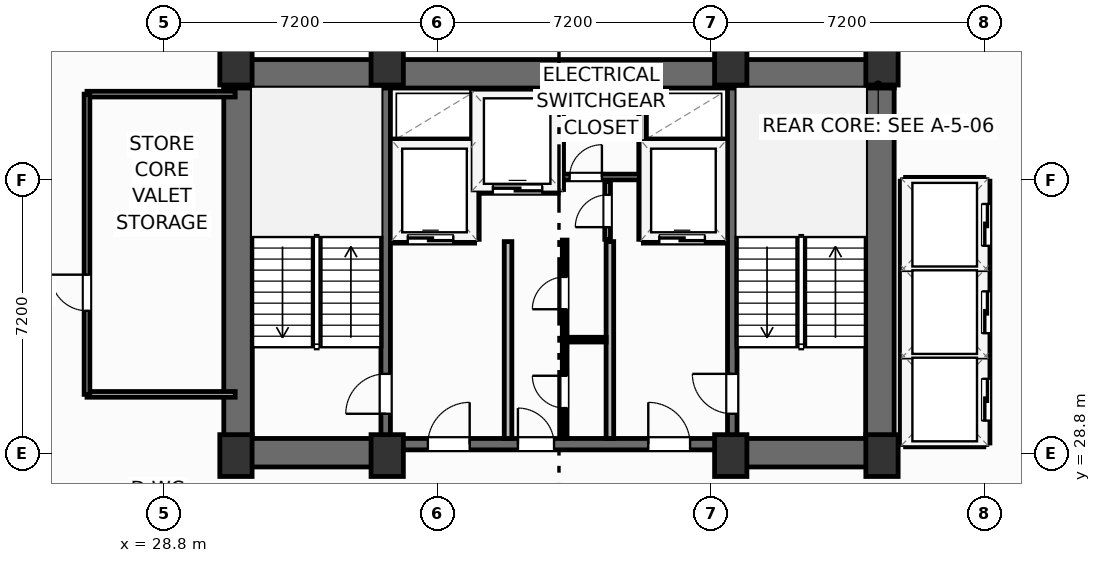
"""IFC4 building model, lengths in metres.
Left out: names, types, materials, properties, quantities, classifications, styles, units other than length and angle.
Written with IfcOpenShell. Run it as: python <this file> out.ifc"""

import sys

from ifc_helpers import new_model, si_unit, direction, frame, frame_2d, origin, origin_2d, place, context, subcontext, project, spatial, rectangle, extrude, element, fill, save


model = new_model("IFC4")
c1 = context("Model", 3, precision=1e-05, world=origin(), true_north=direction((0.0, 1.0)))
c2 = subcontext(c1, "Body", "Model", "MODEL_VIEW")
j1 = project(units=[si_unit("LENGTHUNIT", "METRE"), si_unit("PLANEANGLEUNIT", "RADIAN")], contexts=[c1])
p1 = place(None, origin())
s1 = spatial("IfcSite", under=j1, at=p1, CompositionType="ELEMENT")
p2 = place(p1, origin())
s2 = spatial("IfcBuilding", under=s1, at=p2, CompositionType="ELEMENT")
p3 = place(p2, frame((0.0, 0.0, 147.6)))
s3 = spatial("IfcBuildingStorey", under=s2, at=p3, CompositionType="ELEMENT", Elevation=147.6)
for number, where, z_axis, x_axis in (
    (1, (30.7, 28.75, 0.0), (0.0, 0.0, 1.0), (1.0, 0.0, 0.0)),
    (2, (34.68, 28.75, 0.0), (0.0, 0.0, 1.0), (1.0, 0.0, 0.0)),
    (3, (43.72, 28.75, 0.0), (0.0, 0.0, 1.0), (1.0, 0.0, 0.0)),
    (4, (47.7, 28.75, 0.0), (0.0, 0.0, 1.0), (1.0, 0.0, 0.0)),
    (5, (30.7, 39.05, 0.0), (0.0, 0.0, 1.0), (1.0, 0.0, 0.0)),
    (6, (34.68, 39.05, 0.0), (0.0, 0.0, 1.0), (1.0, 0.0, 0.0)),
    (7, (43.72, 39.05, 0.0), (0.0, 0.0, 1.0), (1.0, 0.0, 0.0)),
    (8, (47.7, 39.05, 0.0), (0.0, 0.0, 1.0), (1.0, 0.0, 0.0)),
):
    element("IfcColumn", number, at=place(p3, frame(where, z_axis=z_axis, x_axis=x_axis)), inside=s3, PredefinedType="COLUMN", context=c2, shape_type="SweptSolid", body=[
        extrude(rectangle(XDim=0.85, YDim=1.1, at=origin_2d()), origin(), (0.0, 0.0, 1.0), 3.7),
    ])
p4 = place(p3, frame((30.38, 38.795, 0.0), z_axis=(0.0, 0.0, 1.0), x_axis=(1.0, 0.0, 0.0)))
e9 = element("IfcWall", 9, at=p4, inside=s3, PredefinedType="SHEAR", context=c2, shape_type="SweptSolid", body=[
    extrude(rectangle(XDim=17.64, YDim=0.75, at=frame_2d((8.82, 0.0))), origin(), (0.0, 0.0, 1.0), 3.45),
])
for number, where, z_axis, x_axis in (
    (10, (30.755, 29.2, 0.0), (0.0, 0.0, 1.0), (0.0, 1.0, 0.0)),
    (11, (47.645, 29.2, 0.0), (0.0, 0.0, 1.0), (0.0, 1.0, 0.0)),
):
    element("IfcWall", number, at=place(p3, frame(where, z_axis=z_axis, x_axis=x_axis)), inside=s3, PredefinedType="SHEAR", context=c2, shape_type="SweptSolid", body=[
        extrude(rectangle(XDim=9.22, YDim=0.75, at=frame_2d((4.61, 0.0))), origin(), (0.0, 0.0, 1.0), 3.45),
    ])
p5 = place(p3, frame((30.38, 28.825, 0.0), z_axis=(0.0, 0.0, 1.0), x_axis=(1.0, 0.0, 0.0)))
e12 = element("IfcWall", 12, at=p5, inside=s3, PredefinedType="SHEAR", context=c2, shape_type="SweptSolid", body=[
    extrude(rectangle(XDim=4.42, YDim=0.75, at=frame_2d((2.21, 0.0))), origin(), (0.0, 0.0, 1.0), 3.45),
])
p6 = place(p3, frame((43.6, 28.825, 0.0), z_axis=(0.0, 0.0, 1.0), x_axis=(1.0, 0.0, 0.0)))
e13 = element("IfcWall", 13, at=p6, inside=s3, PredefinedType="SHEAR", context=c2, shape_type="SweptSolid", body=[
    extrude(rectangle(XDim=4.42, YDim=0.75, at=frame_2d((2.21, 0.0))), origin(), (0.0, 0.0, 1.0), 3.45),
])
p7 = place(p3, frame((34.8, 29.05, 0.0), z_axis=(0.0, 0.0, 1.0), x_axis=(1.0, 0.0, 0.0)))
e14 = element("IfcWall", 14, at=p7, inside=s3, PredefinedType="SHEAR", context=c2, shape_type="SweptSolid", body=[
    extrude(rectangle(XDim=8.8, YDim=0.3, at=frame_2d((4.4, 0.0))), origin(), (0.0, 0.0, 1.0), 3.45),
])
p8 = place(p7, frame((0.95, 0.0, 0.0)))
e15 = element("IfcOpeningElement", 15, at=p8, cuts=e14, PredefinedType="OPENING", context=c2, shape_type="SweptSolid", body=[
    extrude(rectangle(XDim=1.1, YDim=2.15, at=frame_2d((0.55, 1.075))), frame((0.0, 0.16, 0.0), z_axis=(0.0, -1.0, 0.0), x_axis=(1.0, 0.0, 0.0)), (0.0, 0.0, 1.0), 0.32),
])
p9 = place(p7, frame((6.75, 0.0, 0.0)))
e16 = element("IfcOpeningElement", 16, at=p9, cuts=e14, PredefinedType="OPENING", context=c2, shape_type="SweptSolid", body=[
    extrude(rectangle(XDim=1.1, YDim=2.15, at=frame_2d((0.55, 1.075))), frame((0.0, 0.16, 0.0), z_axis=(0.0, -1.0, 0.0), x_axis=(1.0, 0.0, 0.0)), (0.0, 0.0, 1.0), 0.32),
])
p10 = place(p7, frame((3.32, 0.0, 0.0)))
e17 = element("IfcOpeningElement", 17, at=p10, cuts=e14, PredefinedType="OPENING", context=c2, shape_type="SweptSolid", body=[
    extrude(rectangle(XDim=0.95, YDim=2.15, at=frame_2d((0.475, 1.075))), frame((0.0, 0.16, 0.0), z_axis=(0.0, -1.0, 0.0), x_axis=(1.0, 0.0, 0.0)), (0.0, 0.0, 1.0), 0.32),
])
p11 = place(p3, frame((34.64, 29.2, 0.0), z_axis=(0.0, 0.0, 1.0), x_axis=(0.0, 1.0, 0.0)))
e18 = element("IfcWall", 18, at=p11, inside=s3, PredefinedType="SHEAR", context=c2, shape_type="SweptSolid", body=[
    extrude(rectangle(XDim=9.22, YDim=0.25, at=frame_2d((4.61, 0.0))), origin(), (0.0, 0.0, 1.0), 3.45),
])
p12 = place(p11, frame((0.65, 0.0, 0.0)))
e19 = element("IfcOpeningElement", 19, at=p12, cuts=e18, PredefinedType="OPENING", context=c2, shape_type="SweptSolid", body=[
    extrude(rectangle(XDim=1.05, YDim=2.15, at=frame_2d((0.525, 1.075))), frame((0.0, 0.135, 0.0), z_axis=(0.0, -1.0, 0.0), x_axis=(1.0, 0.0, 0.0)), (0.0, 0.0, 1.0), 0.27),
])
p13 = place(p3, frame((43.76, 29.2, 0.0), z_axis=(0.0, 0.0, 1.0), x_axis=(0.0, 1.0, 0.0)))
e20 = element("IfcWall", 20, at=p13, inside=s3, PredefinedType="SHEAR", context=c2, shape_type="SweptSolid", body=[
    extrude(rectangle(XDim=9.22, YDim=0.25, at=frame_2d((4.61, 0.0))), origin(), (0.0, 0.0, 1.0), 3.45),
])
p14 = place(p13, frame((0.65, 0.0, 0.0)))
e21 = element("IfcOpeningElement", 21, at=p14, cuts=e20, PredefinedType="OPENING", context=c2, shape_type="SweptSolid", body=[
    extrude(rectangle(XDim=1.05, YDim=2.15, at=frame_2d((0.525, 1.075))), frame((0.0, 0.135, 0.0), z_axis=(0.0, -1.0, 0.0), x_axis=(1.0, 0.0, 0.0)), (0.0, 0.0, 1.0), 0.27),
])
for number, where, z_axis, x_axis in (
    (22, (37.86, 29.2, 0.0), (0.0, 0.0, 1.0), (0.0, 1.0, 0.0)),
    (23, (40.54, 29.2, 0.0), (0.0, 0.0, 1.0), (0.0, 1.0, 0.0)),
):
    element("IfcWall", number, at=place(p3, frame(where, z_axis=z_axis, x_axis=x_axis)), inside=s3, PredefinedType="PARTITIONING", context=c2, shape_type="SweptSolid", body=[
        extrude(rectangle(XDim=5.18, YDim=0.2, at=frame_2d((2.59, 0.0))), origin(), (0.0, 0.0, 1.0), 3.45),
    ])
p15 = place(p3, frame((34.8, 34.44, 0.0), z_axis=(0.0, 0.0, 1.0), x_axis=(1.0, 0.0, 0.0)))
e24 = element("IfcWall", 24, at=p15, inside=s3, PredefinedType="PARTITIONING", context=c2, shape_type="SweptSolid", body=[
    extrude(rectangle(XDim=2.18, YDim=0.2, at=frame_2d((1.09, 0.0))), origin(), (0.0, 0.0, 1.0), 3.45),
])
p16 = place(p15, frame((0.42, 0.0, 0.0)))
e25 = element("IfcOpeningElement", 25, at=p16, cuts=e24, PredefinedType="OPENING", context=c2, shape_type="SweptSolid", body=[
    extrude(rectangle(XDim=1.2, YDim=2.2, at=frame_2d((0.6, 1.1))), frame((0.0, 0.11, 0.0), z_axis=(0.0, -1.0, 0.0), x_axis=(1.0, 0.0, 0.0)), (0.0, 0.0, 1.0), 0.22),
])
p17 = place(p3, frame((34.8, 36.98, 0.0), z_axis=(0.0, 0.0, 1.0), x_axis=(1.0, 0.0, 0.0)))
e26 = element("IfcWall", 26, at=p17, inside=s3, PredefinedType="PARTITIONING", context=c2, shape_type="SweptSolid", body=[
    extrude(rectangle(XDim=2.18, YDim=0.2, at=frame_2d((1.09, 0.0))), origin(), (0.0, 0.0, 1.0), 3.45),
])
p18 = place(p3, frame((37.0, 34.44, 0.0), z_axis=(0.0, 0.0, 1.0), x_axis=(0.0, 1.0, 0.0)))
e27 = element("IfcWall", 27, at=p18, inside=s3, PredefinedType="PARTITIONING", context=c2, shape_type="SweptSolid", body=[
    extrude(rectangle(XDim=3.9, YDim=0.2, at=frame_2d((1.95, 0.0))), origin(), (0.0, 0.0, 1.0), 3.45),
])
p19 = place(p3, frame((41.42, 34.44, 0.0), z_axis=(0.0, 0.0, 1.0), x_axis=(1.0, 0.0, 0.0)))
e28 = element("IfcWall", 28, at=p19, inside=s3, PredefinedType="PARTITIONING", context=c2, shape_type="SweptSolid", body=[
    extrude(rectangle(XDim=2.18, YDim=0.2, at=frame_2d((1.09, 0.0))), origin(), (0.0, 0.0, 1.0), 3.45),
])
p20 = place(p19, frame((0.42, 0.0, 0.0)))
e29 = element("IfcOpeningElement", 29, at=p20, cuts=e28, PredefinedType="OPENING", context=c2, shape_type="SweptSolid", body=[
    extrude(rectangle(XDim=1.2, YDim=2.2, at=frame_2d((0.6, 1.1))), frame((0.0, 0.11, 0.0), z_axis=(0.0, -1.0, 0.0), x_axis=(1.0, 0.0, 0.0)), (0.0, 0.0, 1.0), 0.22),
])
p21 = place(p3, frame((41.42, 36.98, 0.0), z_axis=(0.0, 0.0, 1.0), x_axis=(1.0, 0.0, 0.0)))
e30 = element("IfcWall", 30, at=p21, inside=s3, PredefinedType="PARTITIONING", context=c2, shape_type="SweptSolid", body=[
    extrude(rectangle(XDim=2.18, YDim=0.2, at=frame_2d((1.09, 0.0))), origin(), (0.0, 0.0, 1.0), 3.45),
])
p22 = place(p3, frame((41.4, 34.44, 0.0), z_axis=(0.0, 0.0, 1.0), x_axis=(0.0, 1.0, 0.0)))
e31 = element("IfcWall", 31, at=p22, inside=s3, PredefinedType="PARTITIONING", context=c2, shape_type="SweptSolid", body=[
    extrude(rectangle(XDim=3.9, YDim=0.2, at=frame_2d((1.95, 0.0))), origin(), (0.0, 0.0, 1.0), 3.45),
])
p23 = place(p3, frame((37.06, 35.75, 0.0), z_axis=(0.0, 0.0, 1.0), x_axis=(1.0, 0.0, 0.0)))
e32 = element("IfcWall", 32, at=p23, inside=s3, PredefinedType="PARTITIONING", context=c2, shape_type="SweptSolid", body=[
    extrude(rectangle(XDim=2.12, YDim=0.2, at=frame_2d((1.06, 0.0))), origin(), (0.0, 0.0, 1.0), 3.45),
])
p24 = place(p23, frame((0.4, 0.0, 0.0)))
e33 = element("IfcOpeningElement", 33, at=p24, cuts=e32, PredefinedType="OPENING", context=c2, shape_type="SweptSolid", body=[
    extrude(rectangle(XDim=1.3, YDim=2.2, at=frame_2d((0.65, 1.1))), frame((0.0, 0.11, 0.0), z_axis=(0.0, -1.0, 0.0), x_axis=(1.0, 0.0, 0.0)), (0.0, 0.0, 1.0), 0.22),
])
p25 = place(p3, frame((39.22, 35.75, 0.0), z_axis=(0.0, 0.0, 1.0), x_axis=(0.0, 1.0, 0.0)))
e34 = element("IfcWall", 34, at=p25, inside=s3, PredefinedType="PARTITIONING", context=c2, shape_type="SweptSolid", body=[
    extrude(rectangle(XDim=2.59, YDim=0.2, at=frame_2d((1.295, 0.0))), origin(), (0.0, 0.0, 1.0), 3.45),
])
p26 = place(p3, frame((39.3, 36.08, 0.0), z_axis=(0.0, 0.0, 1.0), x_axis=(1.0, 0.0, 0.0)))
e35 = element("IfcWall", 35, at=p26, inside=s3, PredefinedType="PARTITIONING", context=c2, shape_type="SweptSolid", body=[
    extrude(rectangle(XDim=2.02, YDim=0.15, at=frame_2d((1.01, 0.0))), origin(), (0.0, 0.0, 1.0), 3.45),
])
p27 = place(p26, frame((0.18, 0.0, 0.0)))
e36 = element("IfcOpeningElement", 36, at=p27, cuts=e35, PredefinedType="OPENING", context=c2, shape_type="SweptSolid", body=[
    extrude(rectangle(XDim=0.85, YDim=2.05, at=frame_2d((0.425, 1.025))), frame((0.0, 0.085, 0.0), z_axis=(0.0, -1.0, 0.0), x_axis=(1.0, 0.0, 0.0)), (0.0, 0.0, 1.0), 0.17),
])
p28 = place(p3, frame((40.48, 34.44, 0.0), z_axis=(0.0, 0.0, 1.0), x_axis=(0.0, 1.0, 0.0)))
e37 = element("IfcWall", 37, at=p28, inside=s3, PredefinedType="PARTITIONING", context=c2, shape_type="SweptSolid", body=[
    extrude(rectangle(XDim=1.52, YDim=0.15, at=frame_2d((0.76, 0.0))), origin(), (0.0, 0.0, 1.0), 3.45),
])
p29 = place(p28, frame((0.32, 0.0, 0.0)))
e38 = element("IfcOpeningElement", 38, at=p29, cuts=e37, PredefinedType="OPENING", context=c2, shape_type="SweptSolid", body=[
    extrude(rectangle(XDim=0.85, YDim=2.05, at=frame_2d((0.425, 1.025))), frame((0.0, 0.085, 0.0), z_axis=(0.0, -1.0, 0.0), x_axis=(1.0, 0.0, 0.0)), (0.0, 0.0, 1.0), 0.17),
])
p30 = place(p3, frame((39.35, 31.8, 0.0), z_axis=(0.0, 0.0, 1.0), x_axis=(1.0, 0.0, 0.0)))
e39 = element("IfcWall", 39, at=p30, inside=s3, PredefinedType="PARTITIONING", context=c2, shape_type="SweptSolid", body=[
    extrude(rectangle(XDim=1.09, YDim=0.125, at=frame_2d((0.545, 0.0))), origin(), (0.0, 0.0, 1.0), 3.45),
])
p31 = place(p3, frame((39.35, 29.2, 0.0), z_axis=(0.0, 0.0, 1.0), x_axis=(0.0, 1.0, 0.0)))
e40 = element("IfcWall", 40, at=p31, inside=s3, PredefinedType="PARTITIONING", context=c2, shape_type="SweptSolid", body=[
    extrude(rectangle(XDim=5.22, YDim=0.125, at=frame_2d((2.61, 0.0))), origin(), (0.0, 0.0, 1.0), 3.45),
])
p32 = place(p31, frame((0.8, 0.0, 0.0)))
e41 = element("IfcOpeningElement", 41, at=p32, cuts=e40, PredefinedType="OPENING", context=c2, shape_type="SweptSolid", body=[
    extrude(rectangle(XDim=0.85, YDim=2.05, at=frame_2d((0.425, 1.025))), frame((0.0, 0.073, 0.0), z_axis=(0.0, -1.0, 0.0), x_axis=(1.0, 0.0, 0.0)), (0.0, 0.0, 1.0), 0.145),
])
p33 = place(p31, frame((3.4, 0.0, 0.0)))
e42 = element("IfcOpeningElement", 42, at=p33, cuts=e40, PredefinedType="OPENING", context=c2, shape_type="SweptSolid", body=[
    extrude(rectangle(XDim=0.85, YDim=2.05, at=frame_2d((0.425, 1.025))), frame((0.0, 0.073, 0.0), z_axis=(0.0, -1.0, 0.0), x_axis=(1.0, 0.0, 0.0)), (0.0, 0.0, 1.0), 0.145),
])
for number, where, z_axis, x_axis in (
    (43, (26.78, 30.36, 0.0), (0.0, 0.0, 1.0), (1.0, 0.0, 0.0)),
    (44, (26.78, 38.26, 0.0), (0.0, 0.0, 1.0), (1.0, 0.0, 0.0)),
):
    element("IfcWall", number, at=place(p3, frame(where, z_axis=z_axis, x_axis=x_axis)), inside=s3, PredefinedType="PARTITIONING", context=c2, shape_type="SweptSolid", body=[
        extrude(rectangle(XDim=3.9, YDim=0.15, at=frame_2d((1.95, 0.0))), origin(), (0.0, 0.0, 1.0), 3.45),
    ])
p34 = place(p3, frame((26.78, 30.36, 0.0), z_axis=(0.0, 0.0, 1.0), x_axis=(0.0, 1.0, 0.0)))
e45 = element("IfcWall", 45, at=p34, inside=s3, PredefinedType="PARTITIONING", context=c2, shape_type="SweptSolid", body=[
    extrude(rectangle(XDim=7.9, YDim=0.15, at=frame_2d((3.95, 0.0))), origin(), (0.0, 0.0, 1.0), 3.45),
])
p35 = place(p34, frame((2.2, 0.0, 0.0)))
e46 = element("IfcOpeningElement", 46, at=p35, cuts=e45, PredefinedType="OPENING", context=c2, shape_type="SweptSolid", body=[
    extrude(rectangle(XDim=0.95, YDim=2.05, at=frame_2d((0.475, 1.025))), frame((0.0, 0.085, 0.0), z_axis=(0.0, -1.0, 0.0), x_axis=(1.0, 0.0, 0.0)), (0.0, 0.0, 1.0), 0.17),
])
for number, where, z_axis, x_axis in (
    (47, (48.32, 31.375, 0.0), (0.0, 0.0, 1.0), (1.0, 0.0, 0.0)),
    (48, (48.32, 33.675, 0.0), (0.0, 0.0, 1.0), (1.0, 0.0, 0.0)),
):
    element("IfcWall", number, at=place(p3, frame(where, z_axis=z_axis, x_axis=x_axis)), inside=s3, PredefinedType="PARTITIONING", context=c2, shape_type="SweptSolid", body=[
        extrude(rectangle(XDim=2.06, YDim=0.2, at=frame_2d((1.03, 0.0))), origin(), (0.0, 0.0, 1.0), 3.45),
    ])
p36 = place(p3, frame((48.32, 29.08, 0.0), z_axis=(0.0, 0.0, 1.0), x_axis=(1.0, 0.0, 0.0)))
e49 = element("IfcWall", 49, at=p36, inside=s3, PredefinedType="PARTITIONING", context=c2, shape_type="SweptSolid", body=[
    extrude(rectangle(XDim=2.06, YDim=0.2, at=frame_2d((1.03, 0.0))), origin(), (0.0, 0.0, 1.0), 2.662),
])
p37 = place(p3, frame((48.32, 35.97, 0.0), z_axis=(0.0, 0.0, 1.0), x_axis=(1.0, 0.0, 0.0)))
e50 = element("IfcWall", 50, at=p37, inside=s3, PredefinedType="PARTITIONING", context=c2, shape_type="SweptSolid", body=[
    extrude(rectangle(XDim=2.06, YDim=0.2, at=frame_2d((1.03, 0.0))), origin(), (0.0, 0.0, 1.0), 3.45),
])
p38 = place(p3, frame((48.28, 29.08, 0.0), z_axis=(0.0, 0.0, 1.0), x_axis=(0.0, 1.0, 0.0)))
e51 = element("IfcWall", 51, at=p38, inside=s3, PredefinedType="PARTITIONING", context=c2, shape_type="SweptSolid", body=[
    extrude(rectangle(XDim=6.89, YDim=0.2, at=frame_2d((3.445, 0.0))), origin(), (0.0, 0.0, 1.0), 3.45),
])
p39 = place(p3, frame((50.44, 29.08, 0.0), z_axis=(0.0, 0.0, 1.0), x_axis=(0.0, 1.0, 0.0)))
e52 = element("IfcWall", 52, at=p39, inside=s3, PredefinedType="PARTITIONING", context=c2, shape_type="SweptSolid", body=[
    extrude(rectangle(XDim=6.89, YDim=0.2, at=frame_2d((3.445, 0.0))), origin(), (0.0, 0.0, 1.0), 3.45),
])
p40 = place(p39, frame((0.59, 0.0, 0.0)))
e53 = element("IfcOpeningElement", 53, at=p40, cuts=e52, PredefinedType="OPENING", context=c2, shape_type="SweptSolid", body=[
    extrude(rectangle(XDim=1.1, YDim=2.15, at=frame_2d((0.55, 1.075))), frame((0.0, 0.11, 0.0), z_axis=(0.0, -1.0, 0.0), x_axis=(1.0, 0.0, 0.0)), (0.0, 0.0, 1.0), 0.22),
])
p41 = place(p39, frame((2.89, 0.0, 0.0)))
e54 = element("IfcOpeningElement", 54, at=p41, cuts=e52, PredefinedType="OPENING", context=c2, shape_type="SweptSolid", body=[
    extrude(rectangle(XDim=1.1, YDim=2.15, at=frame_2d((0.55, 1.075))), frame((0.0, 0.11, 0.0), z_axis=(0.0, -1.0, 0.0), x_axis=(1.0, 0.0, 0.0)), (0.0, 0.0, 1.0), 0.22),
])
p42 = place(p39, frame((5.19, 0.0, 0.0)))
e55 = element("IfcOpeningElement", 55, at=p42, cuts=e52, PredefinedType="OPENING", context=c2, shape_type="SweptSolid", body=[
    extrude(rectangle(XDim=1.1, YDim=2.15, at=frame_2d((0.55, 1.075))), frame((0.0, 0.11, 0.0), z_axis=(0.0, -1.0, 0.0), x_axis=(1.0, 0.0, 0.0)), (0.0, 0.0, 1.0), 0.22),
])
p43 = place(p12, origin())
e56 = element("IfcDoor", 56, at=p43, inside=s3, OperationType="SINGLE_SWING_LEFT", PredefinedType="DOOR", context=c2, shape_type="SweptSolid", body=[
    extrude(rectangle(XDim=1.05, YDim=2.15, at=frame_2d((0.525, 1.075))), frame((0.0, 0.025, 0.0), z_axis=(0.0, -1.0, 0.0), x_axis=(1.0, 0.0, 0.0)), (0.0, 0.0, 1.0), 0.05),
])
fill(e19, e56)
p44 = place(p14, origin())
e57 = element("IfcDoor", 57, at=p44, inside=s3, OperationType="SINGLE_SWING_RIGHT", PredefinedType="DOOR", context=c2, shape_type="SweptSolid", body=[
    extrude(rectangle(XDim=1.05, YDim=2.15, at=frame_2d((0.525, 1.075))), frame((0.0, 0.025, 0.0), z_axis=(0.0, -1.0, 0.0), x_axis=(1.0, 0.0, 0.0)), (0.0, 0.0, 1.0), 0.05),
])
fill(e21, e57)
p45 = place(p8, origin())
e58 = element("IfcDoor", 58, at=p45, inside=s3, OperationType="SINGLE_SWING_RIGHT", PredefinedType="DOOR", context=c2, shape_type="SweptSolid", body=[
    extrude(rectangle(XDim=1.1, YDim=2.15, at=frame_2d((0.55, 1.075))), frame((0.0, 0.025, 0.0), z_axis=(0.0, -1.0, 0.0), x_axis=(1.0, 0.0, 0.0)), (0.0, 0.0, 1.0), 0.05),
])
fill(e15, e58)
p46 = place(p9, origin())
e59 = element("IfcDoor", 59, at=p46, inside=s3, OperationType="SINGLE_SWING_LEFT", PredefinedType="DOOR", context=c2, shape_type="SweptSolid", body=[
    extrude(rectangle(XDim=1.1, YDim=2.15, at=frame_2d((0.55, 1.075))), frame((0.0, 0.025, 0.0), z_axis=(0.0, -1.0, 0.0), x_axis=(1.0, 0.0, 0.0)), (0.0, 0.0, 1.0), 0.05),
])
fill(e16, e59)
p47 = place(p16, origin())
e60 = element("IfcDoor", 60, at=p47, inside=s3, OperationType="SLIDING_TO_LEFT", PredefinedType="DOOR", context=c2, shape_type="SweptSolid", body=[
    extrude(rectangle(XDim=1.2, YDim=2.2, at=frame_2d((0.6, 1.1))), frame((0.0, 0.025, 0.0), z_axis=(0.0, -1.0, 0.0), x_axis=(1.0, 0.0, 0.0)), (0.0, 0.0, 1.0), 0.05),
])
fill(e25, e60)
p48 = place(p20, origin())
e61 = element("IfcDoor", 61, at=p48, inside=s3, OperationType="SLIDING_TO_LEFT", PredefinedType="DOOR", context=c2, shape_type="SweptSolid", body=[
    extrude(rectangle(XDim=1.2, YDim=2.2, at=frame_2d((0.6, 1.1))), frame((0.0, 0.025, 0.0), z_axis=(0.0, -1.0, 0.0), x_axis=(1.0, 0.0, 0.0)), (0.0, 0.0, 1.0), 0.05),
])
fill(e29, e61)
p49 = place(p24, origin())
e62 = element("IfcDoor", 62, at=p49, inside=s3, OperationType="SLIDING_TO_LEFT", PredefinedType="DOOR", context=c2, shape_type="SweptSolid", body=[
    extrude(rectangle(XDim=1.3, YDim=2.2, at=frame_2d((0.65, 1.1))), frame((0.0, 0.025, 0.0), z_axis=(0.0, -1.0, 0.0), x_axis=(1.0, 0.0, 0.0)), (0.0, 0.0, 1.0), 0.05),
])
fill(e33, e62)
p50 = place(p27, origin())
e63 = element("IfcDoor", 63, at=p50, inside=s3, OperationType="SINGLE_SWING_RIGHT", PredefinedType="DOOR", context=c2, shape_type="SweptSolid", body=[
    extrude(rectangle(XDim=0.85, YDim=2.05, at=frame_2d((0.425, 1.025))), frame((0.0, 0.025, 0.0), z_axis=(0.0, -1.0, 0.0), x_axis=(1.0, 0.0, 0.0)), (0.0, 0.0, 1.0), 0.05),
])
fill(e36, e63)
p51 = place(p29, origin())
e64 = element("IfcDoor", 64, at=p51, inside=s3, OperationType="SINGLE_SWING_LEFT", PredefinedType="DOOR", context=c2, shape_type="SweptSolid", body=[
    extrude(rectangle(XDim=0.85, YDim=2.05, at=frame_2d((0.425, 1.025))), frame((0.0, 0.025, 0.0), z_axis=(0.0, -1.0, 0.0), x_axis=(1.0, 0.0, 0.0)), (0.0, 0.0, 1.0), 0.05),
])
fill(e38, e64)
p52 = place(p32, origin())
e65 = element("IfcDoor", 65, at=p52, inside=s3, OperationType="SINGLE_SWING_RIGHT", PredefinedType="DOOR", context=c2, shape_type="SweptSolid", body=[
    extrude(rectangle(XDim=0.85, YDim=2.05, at=frame_2d((0.425, 1.025))), frame((0.0, 0.025, 0.0), z_axis=(0.0, -1.0, 0.0), x_axis=(1.0, 0.0, 0.0)), (0.0, 0.0, 1.0), 0.05),
])
fill(e41, e65)
p53 = place(p33, origin())
e66 = element("IfcDoor", 66, at=p53, inside=s3, OperationType="SINGLE_SWING_LEFT", PredefinedType="DOOR", context=c2, shape_type="SweptSolid", body=[
    extrude(rectangle(XDim=0.85, YDim=2.05, at=frame_2d((0.425, 1.025))), frame((0.0, 0.025, 0.0), z_axis=(0.0, -1.0, 0.0), x_axis=(1.0, 0.0, 0.0)), (0.0, 0.0, 1.0), 0.05),
])
fill(e42, e66)
p54 = place(p10, origin())
e67 = element("IfcDoor", 67, at=p54, inside=s3, OperationType="SINGLE_SWING_LEFT", PredefinedType="DOOR", context=c2, shape_type="SweptSolid", body=[
    extrude(rectangle(XDim=0.95, YDim=2.15, at=frame_2d((0.475, 1.075))), frame((0.0, 0.025, 0.0), z_axis=(0.0, -1.0, 0.0), x_axis=(1.0, 0.0, 0.0)), (0.0, 0.0, 1.0), 0.05),
])
fill(e17, e67)
p55 = place(p35, origin())
e68 = element("IfcDoor", 68, at=p55, inside=s3, OperationType="SINGLE_SWING_RIGHT", PredefinedType="DOOR", context=c2, shape_type="SweptSolid", body=[
    extrude(rectangle(XDim=0.95, YDim=2.05, at=frame_2d((0.475, 1.025))), frame((0.0, 0.025, 0.0), z_axis=(0.0, -1.0, 0.0), x_axis=(1.0, 0.0, 0.0)), (0.0, 0.0, 1.0), 0.05),
])
fill(e46, e68)
p56 = place(p40, origin())
e69 = element("IfcDoor", 69, at=p56, inside=s3, OperationType="SLIDING_TO_LEFT", PredefinedType="DOOR", context=c2, shape_type="SweptSolid", body=[
    extrude(rectangle(XDim=1.1, YDim=2.15, at=frame_2d((0.55, 1.075))), frame((0.0, 0.025, 0.0), z_axis=(0.0, -1.0, 0.0), x_axis=(1.0, 0.0, 0.0)), (0.0, 0.0, 1.0), 0.05),
])
fill(e53, e69)
p57 = place(p41, origin())
e70 = element("IfcDoor", 70, at=p57, inside=s3, OperationType="SLIDING_TO_LEFT", PredefinedType="DOOR", context=c2, shape_type="SweptSolid", body=[
    extrude(rectangle(XDim=1.1, YDim=2.15, at=frame_2d((0.55, 1.075))), frame((0.0, 0.025, 0.0), z_axis=(0.0, -1.0, 0.0), x_axis=(1.0, 0.0, 0.0)), (0.0, 0.0, 1.0), 0.05),
])
fill(e54, e70)
p58 = place(p42, origin())
e71 = element("IfcDoor", 71, at=p58, inside=s3, OperationType="SLIDING_TO_LEFT", PredefinedType="DOOR", context=c2, shape_type="SweptSolid", body=[
    extrude(rectangle(XDim=1.1, YDim=2.15, at=frame_2d((0.55, 1.075))), frame((0.0, 0.025, 0.0), z_axis=(0.0, -1.0, 0.0), x_axis=(1.0, 0.0, 0.0)), (0.0, 0.0, 1.0), 0.05),
])
fill(e55, e71)
save(model, sys.argv[1])
